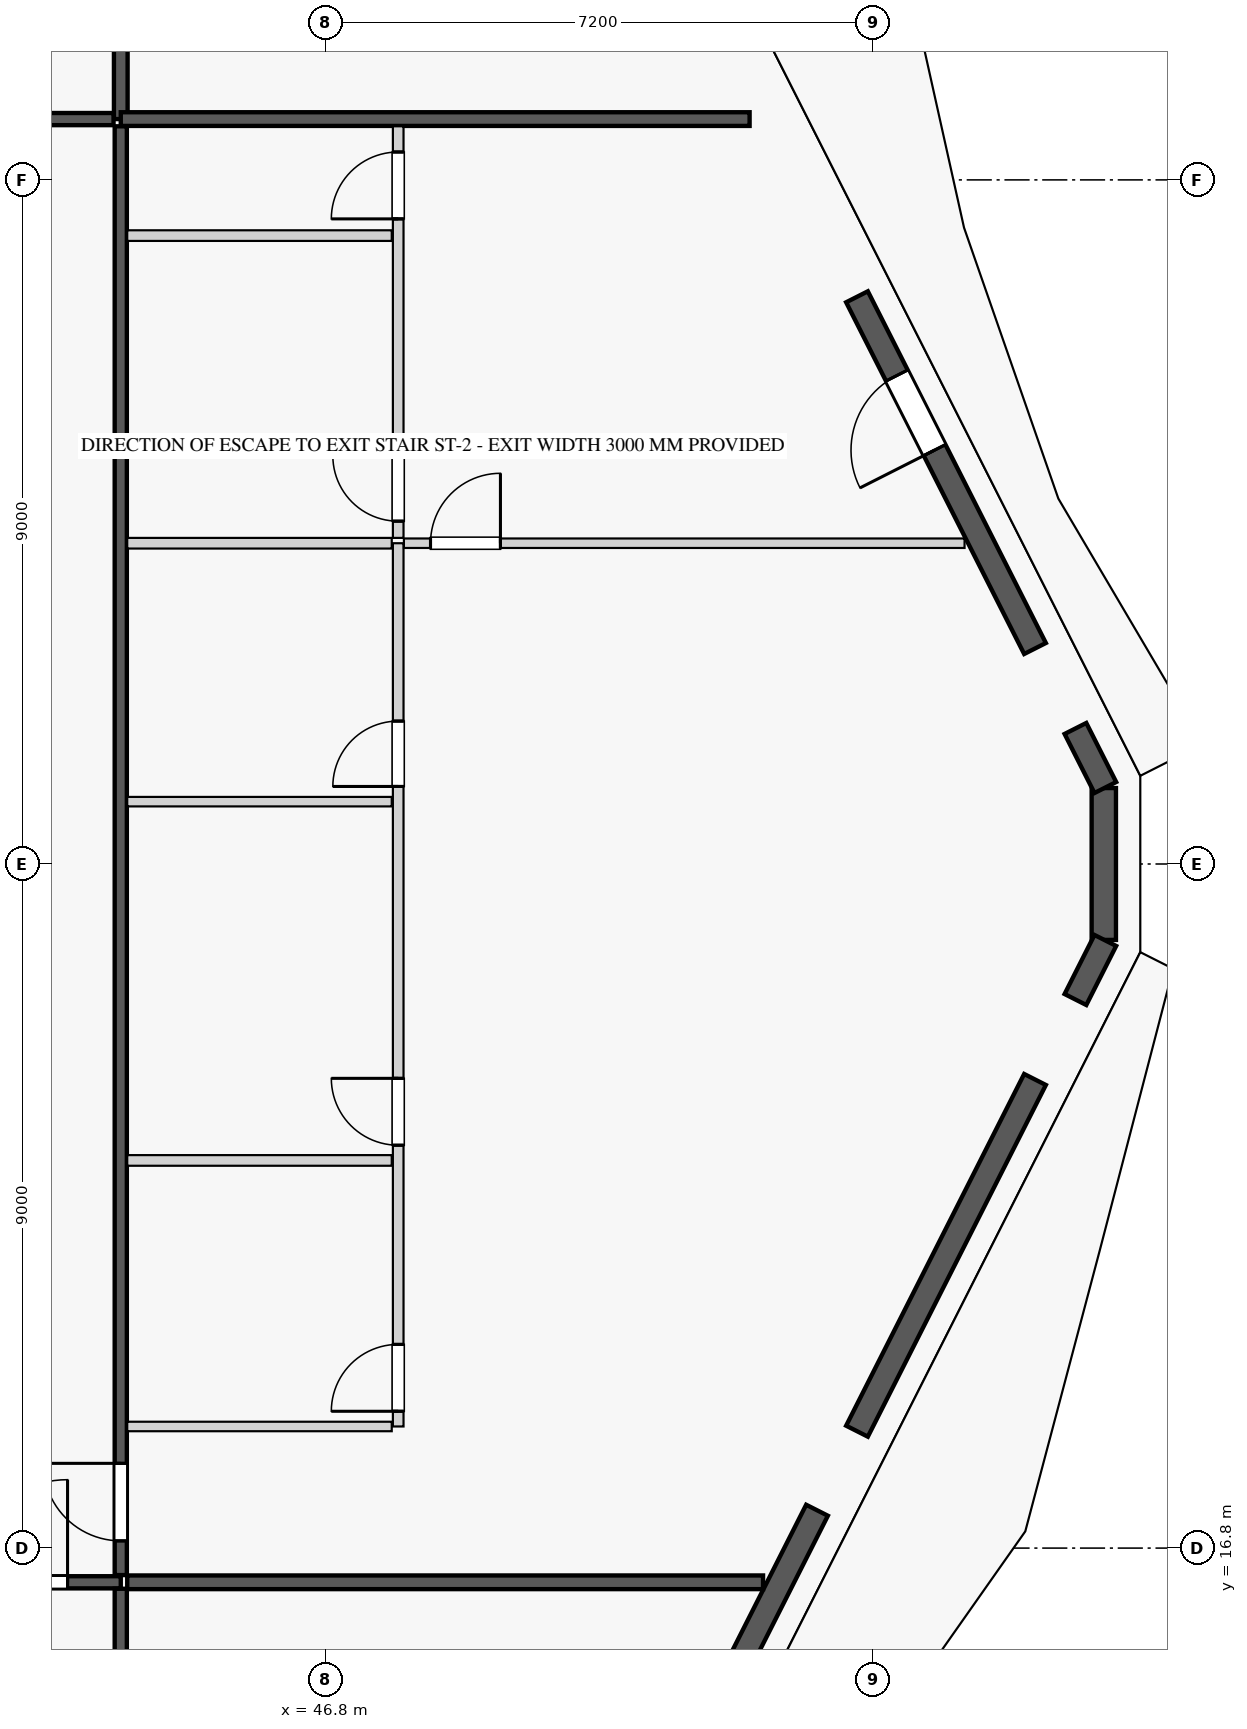
"""IFC4 building model, lengths in metres.
Left out: names, types, materials, properties, quantities, classifications, styles, units other than length and angle.
Written with IfcOpenShell. Run it as: python <this file> out.ifc"""

import sys

from ifc_helpers import new_model, si_unit, direction, frame, frame_2d, origin, origin_2d, place, context, subcontext, project, spatial, rectangle, extrude, element, fill, save


model = new_model("IFC4")
c1 = context("Model", 3, precision=1e-05, world=origin(), true_north=direction((0.0, 1.0)))
c2 = subcontext(c1, "Body", "Model", "MODEL_VIEW")
j1 = project(units=[si_unit("LENGTHUNIT", "METRE"), si_unit("PLANEANGLEUNIT", "RADIAN")], contexts=[c1])
p1 = place(None, origin())
s1 = spatial("IfcSite", under=j1, at=p1, CompositionType="ELEMENT")
p2 = place(p1, origin())
s2 = spatial("IfcBuilding", under=s1, at=p2, CompositionType="ELEMENT")
p3 = place(p2, frame((0.0, 0.0, 167.7)))
s3 = spatial("IfcBuildingStorey", under=s2, at=p3, CompositionType="ELEMENT", Elevation=167.7)
for number, where, z_axis, x_axis in (
    (1, (53.452, 17.824, 0.0), (0.0, 0.0, 1.0), (1.0, 0.0, 0.0)),
    (2, (56.357, 23.491, 0.0), (0.0, 0.0, 1.0), (1.0, 0.0, 0.0)),
    (3, (56.357, 28.109, 0.0), (0.0, 0.0, 1.0), (1.0, 0.0, 0.0)),
    (4, (53.452, 33.776, 0.0), (0.0, 0.0, 1.0), (1.0, 0.0, 0.0)),
):
    element("IfcColumn", number, at=place(p3, frame(where, z_axis=z_axis, x_axis=x_axis)), inside=s3, PredefinedType="COLUMN", context=c2, shape_type="SweptSolid", body=[
        extrude(rectangle(XDim=0.9, YDim=0.9, at=origin_2d()), origin(), (0.0, 0.0, 1.0), 4.2),
    ])
p4 = place(p3, frame((56.357, 25.8, 0.0), z_axis=(0.0, 0.0, 1.0), x_axis=(0.0, 1.0, 0.0)))
e5 = element("IfcColumn", 5, at=p4, inside=s3, PredefinedType="PILASTER", context=c2, shape_type="SweptSolid", body=[
    extrude(rectangle(XDim=0.5, YDim=0.35, at=origin_2d()), origin(), (0.0, 0.0, 1.0), 4.2),
])
p5 = place(p3, frame((57.033, 24.801, 0.0), z_axis=(0.0, 0.0, 1.0), x_axis=(0.0, 1.0, 0.0)))
e6 = element("IfcWall", 6, at=p5, inside=s3, PredefinedType="STANDARD", context=c2, shape_type="SweptSolid", body=[
    extrude(rectangle(XDim=1.998, YDim=0.32, at=frame_2d((0.999, 0.0))), origin(), (0.0, 0.0, 1.0), 4.0),
])
p6 = place(p3, frame((50.818, 12.471, 0.0), z_axis=(0.0, 0.0, 1.0), x_axis=(0.451396817628, 0.892323323149, 0.0)))
e7 = element("IfcWall", 7, at=p6, inside=s3, PredefinedType="STANDARD", context=c2, shape_type="SweptSolid", body=[
    extrude(rectangle(XDim=5.41, YDim=0.32, at=frame_2d((2.705, 0.0))), origin(), (0.0, 0.0, 1.0), 2.59),
])
p7 = place(p6, frame((1.501, 0.0, 0.0)))
e8 = element("IfcOpeningElement", 8, at=p7, cuts=e7, PredefinedType="OPENING", context=c2, shape_type="SweptSolid", body=[
    extrude(rectangle(XDim=1.1, YDim=2.25, at=frame_2d((0.55, 1.125))), frame((0.0, 0.17, 0.0), z_axis=(0.0, -1.0, 0.0), x_axis=(1.0, 0.0, 0.0)), (0.0, 0.0, 1.0), 0.34),
])
p8 = place(p3, frame((53.786, 18.338, 0.0), z_axis=(0.0, 0.0, 1.0), x_axis=(0.451595655361, 0.892222709899, 0.0)))
e9 = element("IfcWall", 9, at=p8, inside=s3, PredefinedType="STANDARD", context=c2, shape_type="SweptSolid", body=[
    extrude(rectangle(XDim=5.186, YDim=0.32, at=frame_2d((2.593, 0.0))), origin(), (0.0, 0.0, 1.0), 2.59),
])
p9 = place(p8, frame((2.043, 0.0, 0.75)))
e10 = element("IfcOpeningElement", 10, at=p9, cuts=e9, PredefinedType="OPENING", context=c2, shape_type="SweptSolid", body=[
    extrude(rectangle(XDim=1.1, YDim=1.69, at=frame_2d((0.55, 0.845))), frame((0.0, 0.17, 0.0), z_axis=(0.0, -1.0, 0.0), x_axis=(1.0, 0.0, 0.0)), (0.0, 0.0, 1.0), 0.34),
])
p10 = place(p3, frame((56.66, 24.017, 0.0), z_axis=(0.0, 0.0, 1.0), x_axis=(0.451470851004, 0.892285868258, 0.0)))
e11 = element("IfcWall", 11, at=p10, inside=s3, PredefinedType="STANDARD", context=c2, shape_type="SweptSolid", body=[
    extrude(rectangle(XDim=0.871, YDim=0.32, at=frame_2d((0.435, 0.0))), origin(), (0.0, 0.0, 1.0), 4.0),
])
p11 = place(p3, frame((57.053, 26.806, 0.0), z_axis=(0.0, 0.0, 1.0), x_axis=(-0.451357912295, 0.892343003003, 0.0)))
e12 = element("IfcWall", 12, at=p11, inside=s3, PredefinedType="STANDARD", context=c2, shape_type="SweptSolid", body=[
    extrude(rectangle(XDim=0.871, YDim=0.32, at=frame_2d((0.436, 0.0))), origin(), (0.0, 0.0, 1.0), 4.0),
])
p12 = place(p3, frame((56.128, 28.635, 0.0), z_axis=(0.0, 0.0, 1.0), x_axis=(-0.451614623916, 0.892213108772, 0.0)))
e13 = element("IfcWall", 13, at=p12, inside=s3, PredefinedType="STANDARD", context=c2, shape_type="SweptSolid", body=[
    extrude(rectangle(XDim=5.186, YDim=0.32, at=frame_2d((2.593, 0.0))), origin(), (0.0, 0.0, 1.0), 2.59),
])
p13 = place(p12, frame((2.925, 0.0, 0.0)))
e14 = element("IfcOpeningElement", 14, at=p13, cuts=e13, PredefinedType="OPENING", context=c2, shape_type="SweptSolid", body=[
    extrude(rectangle(XDim=1.1, YDim=2.25, at=frame_2d((0.55, 1.125))), frame((0.0, 0.17, 0.0), z_axis=(0.0, -1.0, 0.0), x_axis=(1.0, 0.0, 0.0)), (0.0, 0.0, 1.0), 0.34),
])
p14 = place(p12, frame((0.22, 0.0, 0.75)))
e15 = element("IfcOpeningElement", 15, at=p14, cuts=e13, PredefinedType="OPENING", context=c2, shape_type="SweptSolid", body=[
    extrude(rectangle(XDim=1.094, YDim=1.56, at=frame_2d((0.547, 0.78))), frame((0.0, 0.17, 0.0), z_axis=(0.0, -1.0, 0.0), x_axis=(1.0, 0.0, 0.0)), (0.0, 0.0, 1.0), 0.34),
])
p15 = place(p3, frame((20.7, 16.35, 0.0), z_axis=(0.0, 0.0, 1.0), x_axis=(1.0, 0.0, 0.0)))
e16 = element("IfcWall", 16, at=p15, inside=s3, PredefinedType="PARTITIONING", context=c2, shape_type="SweptSolid", body=[
    extrude(rectangle(XDim=23.4, YDim=0.16, at=frame_2d((11.7, 0.0))), origin(), (0.0, 0.0, 1.0), 4.0),
])
p16 = place(p15, frame((8.518, 0.0, 0.0)))
e17 = element("IfcOpeningElement", 17, at=p16, cuts=e16, PredefinedType="OPENING", context=c2, shape_type="SweptSolid", body=[
    extrude(rectangle(XDim=1.35, YDim=2.35, at=frame_2d((0.675, 1.175))), frame((0.0, 0.09, 0.0), z_axis=(0.0, -1.0, 0.0), x_axis=(1.0, 0.0, 0.0)), (0.0, 0.0, 1.0), 0.18),
])
p17 = place(p15, frame((21.35, 0.0, 0.0)))
e18 = element("IfcOpeningElement", 18, at=p17, cuts=e16, PredefinedType="OPENING", context=c2, shape_type="SweptSolid", body=[
    extrude(rectangle(XDim=1.35, YDim=2.35, at=frame_2d((0.675, 1.175))), frame((0.0, 0.09, 0.0), z_axis=(0.0, -1.0, 0.0), x_axis=(1.0, 0.0, 0.0)), (0.0, 0.0, 1.0), 0.18),
])
p18 = place(p3, frame((44.1, 4.015, 0.0), z_axis=(0.0, 0.0, 1.0), x_axis=(0.0, 1.0, 0.0)))
e19 = element("IfcWall", 19, at=p18, inside=s3, PredefinedType="PARTITIONING", context=c2, shape_type="SweptSolid", body=[
    extrude(rectangle(XDim=12.25, YDim=0.16, at=frame_2d((6.125, 0.0))), origin(), (0.0, 0.0, 1.0), 4.0),
])
p19 = place(p3, frame((44.1, 35.6, 0.0), z_axis=(0.0, 0.0, 1.0), x_axis=(0.0, 1.0, 0.0)))
e20 = element("IfcWall", 20, at=p19, inside=s3, PredefinedType="PARTITIONING", context=c2, shape_type="SweptSolid", body=[
    extrude(rectangle(XDim=11.985, YDim=0.18, at=frame_2d((5.992, 0.0))), origin(), (0.0, 0.0, 1.0), 4.0),
])
p20 = place(p3, frame((28.663, 35.6, 0.0), z_axis=(0.0, 0.0, 1.0), x_axis=(1.0, 0.0, 0.0)))
e21 = element("IfcWall", 21, at=p20, inside=s3, PredefinedType="PARTITIONING", context=c2, shape_type="SweptSolid", body=[
    extrude(rectangle(XDim=15.342, YDim=0.16, at=frame_2d((7.671, 0.0))), origin(), (0.0, 0.0, 1.0), 4.0),
])
p21 = place(p20, frame((13.387, 0.0, 0.0)))
e22 = element("IfcOpeningElement", 22, at=p21, cuts=e21, PredefinedType="OPENING", context=c2, shape_type="SweptSolid", body=[
    extrude(rectangle(XDim=1.02, YDim=2.25, at=frame_2d((0.51, 1.125))), frame((0.0, 0.09, 0.0), z_axis=(0.0, -1.0, 0.0), x_axis=(1.0, 0.0, 0.0)), (0.0, 0.0, 1.0), 0.18),
])
p22 = place(p3, frame((44.185, 16.35, 0.0), z_axis=(0.0, 0.0, 1.0), x_axis=(1.0, 0.0, 0.0)))
e23 = element("IfcWall", 23, at=p22, inside=s3, PredefinedType="PARTITIONING", context=c2, shape_type="SweptSolid", body=[
    extrude(rectangle(XDim=8.365, YDim=0.18, at=frame_2d((4.183, 0.0))), origin(), (0.0, 0.0, 1.0), 4.0),
])
p23 = place(p3, frame((44.1, 35.6, 0.0), z_axis=(0.0, 0.0, 1.0), x_axis=(1.0, 0.0, 0.0)))
e24 = element("IfcWall", 24, at=p23, inside=s3, PredefinedType="PARTITIONING", context=c2, shape_type="SweptSolid", body=[
    extrude(rectangle(XDim=8.273, YDim=0.18, at=frame_2d((4.136, 0.0))), origin(), (0.0, 0.0, 1.0), 4.0),
])
p24 = place(p3, frame((44.1, 16.445, 0.0), z_axis=(0.0, 0.0, 1.0), x_axis=(0.0, 1.0, 0.0)))
e25 = element("IfcWall", 25, at=p24, inside=s3, PredefinedType="PARTITIONING", context=c2, shape_type="SweptSolid", body=[
    extrude(rectangle(XDim=19.06, YDim=0.16, at=frame_2d((9.53, 0.0))), origin(), (0.0, 0.0, 1.0), 4.0),
])
p25 = place(p24, frame((0.45, 0.0, 0.0)))
e26 = element("IfcOpeningElement", 26, at=p25, cuts=e25, PredefinedType="OPENING", context=c2, shape_type="SweptSolid", body=[
    extrude(rectangle(XDim=1.02, YDim=2.25, at=frame_2d((0.51, 1.125))), frame((0.0, 0.09, 0.0), z_axis=(0.0, -1.0, 0.0), x_axis=(1.0, 0.0, 0.0)), (0.0, 0.0, 1.0), 0.18),
])
p26 = place(p3, frame((44.185, 18.4, 0.0), z_axis=(0.0, 0.0, 1.0), x_axis=(1.0, 0.0, 0.0)))
e27 = element("IfcWall", 27, at=p26, inside=s3, PredefinedType="PARTITIONING", context=c2, shape_type="SweptSolid", body=[
    extrude(rectangle(XDim=3.48, YDim=0.125, at=frame_2d((1.74, 0.0))), origin(), (0.0, 0.0, 1.0), 2.59),
])
p27 = place(p3, frame((47.75, 18.4, 0.0), z_axis=(0.0, 0.0, 1.0), x_axis=(0.0, 1.0, 0.0)))
e28 = element("IfcWall", 28, at=p27, inside=s3, PredefinedType="PLUMBINGWALL", context=c2, shape_type="SweptSolid", body=[
    extrude(rectangle(XDim=11.62, YDim=0.14, at=frame_2d((5.81, 0.0))), origin(), (0.0, 0.0, 1.0), 4.0),
])
p28 = place(p27, frame((0.2, 0.0, 0.0)))
e29 = element("IfcOpeningElement", 29, at=p28, cuts=e28, PredefinedType="OPENING", context=c2, shape_type="SweptSolid", body=[
    extrude(rectangle(XDim=0.88, YDim=2.15, at=frame_2d((0.44, 1.075))), frame((0.0, 0.08, 0.0), z_axis=(0.0, -1.0, 0.0), x_axis=(1.0, 0.0, 0.0)), (0.0, 0.0, 1.0), 0.16),
])
p29 = place(p27, frame((3.7, 0.0, 0.0)))
e30 = element("IfcOpeningElement", 30, at=p29, cuts=e28, PredefinedType="OPENING", context=c2, shape_type="SweptSolid", body=[
    extrude(rectangle(XDim=0.88, YDim=2.15, at=frame_2d((0.44, 1.075))), frame((0.0, 0.08, 0.0), z_axis=(0.0, -1.0, 0.0), x_axis=(1.0, 0.0, 0.0)), (0.0, 0.0, 1.0), 0.16),
])
p30 = place(p27, frame((8.42, 0.0, 0.0)))
e31 = element("IfcOpeningElement", 31, at=p30, cuts=e28, PredefinedType="OPENING", context=c2, shape_type="SweptSolid", body=[
    extrude(rectangle(XDim=0.86, YDim=2.1, at=frame_2d((0.43, 1.05))), frame((0.0, 0.08, 0.0), z_axis=(0.0, -1.0, 0.0), x_axis=(1.0, 0.0, 0.0)), (0.0, 0.0, 1.0), 0.16),
])
p31 = place(p3, frame((47.75, 30.09, 0.0), z_axis=(0.0, 0.0, 1.0), x_axis=(0.0, 1.0, 0.0)))
e32 = element("IfcWall", 32, at=p31, inside=s3, PredefinedType="PLUMBINGWALL", context=c2, shape_type="SweptSolid", body=[
    extrude(rectangle(XDim=5.415, YDim=0.14, at=frame_2d((2.708, 0.0))), origin(), (0.0, 0.0, 1.0), 4.0),
])
p32 = place(p31, frame((0.22, 0.0, 0.0)))
e33 = element("IfcOpeningElement", 33, at=p32, cuts=e32, PredefinedType="OPENING", context=c2, shape_type="SweptSolid", body=[
    extrude(rectangle(XDim=0.86, YDim=2.1, at=frame_2d((0.43, 1.05))), frame((0.0, 0.08, 0.0), z_axis=(0.0, -1.0, 0.0), x_axis=(1.0, 0.0, 0.0)), (0.0, 0.0, 1.0), 0.16),
])
p33 = place(p31, frame((4.197, 0.0, 0.0)))
e34 = element("IfcOpeningElement", 34, at=p33, cuts=e32, PredefinedType="OPENING", context=c2, shape_type="SweptSolid", body=[
    extrude(rectangle(XDim=0.88, YDim=2.15, at=frame_2d((0.44, 1.075))), frame((0.0, 0.08, 0.0), z_axis=(0.0, -1.0, 0.0), x_axis=(1.0, 0.0, 0.0)), (0.0, 0.0, 1.0), 0.16),
])
p34 = place(p3, frame((44.185, 30.02, 0.0), z_axis=(0.0, 0.0, 1.0), x_axis=(1.0, 0.0, 0.0)))
e35 = element("IfcWall", 35, at=p34, inside=s3, PredefinedType="PLUMBINGWALL", context=c2, shape_type="SweptSolid", body=[
    extrude(rectangle(XDim=3.48, YDim=0.14, at=frame_2d((1.74, 0.0))), origin(), (0.0, 0.0, 1.0), 4.0),
])
p35 = place(p3, frame((47.825, 30.02, 0.0), z_axis=(0.0, 0.0, 1.0), x_axis=(1.0, 0.0, 0.0)))
e36 = element("IfcWall", 36, at=p35, inside=s3, PredefinedType="PARTITIONING", context=c2, shape_type="SweptSolid", body=[
    extrude(rectangle(XDim=7.376, YDim=0.125, at=frame_2d((3.688, 0.0))), origin(), (0.0, 0.0, 1.0), 4.0),
])
p36 = place(p35, frame((0.35, 0.0, 0.0)))
e37 = element("IfcOpeningElement", 37, at=p36, cuts=e36, PredefinedType="OPENING", context=c2, shape_type="SweptSolid", body=[
    extrude(rectangle(XDim=0.92, YDim=2.15, at=frame_2d((0.46, 1.075))), frame((0.0, 0.073, 0.0), z_axis=(0.0, -1.0, 0.0), x_axis=(1.0, 0.0, 0.0)), (0.0, 0.0, 1.0), 0.145),
])
p37 = place(p3, frame((44.185, 21.9, 0.0), z_axis=(0.0, 0.0, 1.0), x_axis=(1.0, 0.0, 0.0)))
e38 = element("IfcWall", 38, at=p37, inside=s3, PredefinedType="PLUMBINGWALL", context=c2, shape_type="SweptSolid", body=[
    extrude(rectangle(XDim=3.48, YDim=0.14, at=frame_2d((1.74, 0.0))), origin(), (0.0, 0.0, 1.0), 4.0),
])
p38 = place(p3, frame((44.185, 26.62, 0.0), z_axis=(0.0, 0.0, 1.0), x_axis=(1.0, 0.0, 0.0)))
e39 = element("IfcWall", 39, at=p38, inside=s3, PredefinedType="PARTITIONING", context=c2, shape_type="SweptSolid", body=[
    extrude(rectangle(XDim=3.48, YDim=0.125, at=frame_2d((1.74, 0.0))), origin(), (0.0, 0.0, 1.0), 4.0),
])
p39 = place(p3, frame((44.185, 34.067, 0.0), z_axis=(0.0, 0.0, 1.0), x_axis=(1.0, 0.0, 0.0)))
e40 = element("IfcWall", 40, at=p39, inside=s3, PredefinedType="PLUMBINGWALL", context=c2, shape_type="SweptSolid", body=[
    extrude(rectangle(XDim=3.48, YDim=0.14, at=frame_2d((1.74, 0.0))), origin(), (0.0, 0.0, 1.0), 4.0),
])
p40 = place(p9, origin())
e41 = element("IfcWindow", 41, at=p40, inside=s3, PartitioningType="SINGLE_PANEL", PredefinedType="WINDOW", context=c2, shape_type="SweptSolid", body=[
    extrude(rectangle(XDim=1.1, YDim=1.69, at=frame_2d((0.55, 0.845))), frame((0.0, 0.03, 0.0), z_axis=(0.0, -1.0, 0.0), x_axis=(1.0, 0.0, 0.0)), (0.0, 0.0, 1.0), 0.06),
])
fill(e10, e41)
p41 = place(p13, origin())
e42 = element("IfcDoor", 42, at=p41, inside=s3, OperationType="SINGLE_SWING_LEFT", PredefinedType="DOOR", context=c2, shape_type="SweptSolid", body=[
    extrude(rectangle(XDim=1.1, YDim=2.25, at=frame_2d((0.55, 1.125))), frame((0.0, 0.025, 0.0), z_axis=(0.0, -1.0, 0.0), x_axis=(1.0, 0.0, 0.0)), (0.0, 0.0, 1.0), 0.05),
])
fill(e14, e42)
p42 = place(p17, origin())
e43 = element("IfcDoor", 43, at=p42, inside=s3, OperationType="SINGLE_SWING_RIGHT", PredefinedType="DOOR", context=c2, shape_type="SweptSolid", body=[
    extrude(rectangle(XDim=1.35, YDim=2.35, at=frame_2d((0.675, 1.175))), frame((0.0, 0.025, 0.0), z_axis=(0.0, -1.0, 0.0), x_axis=(1.0, 0.0, 0.0)), (0.0, 0.0, 1.0), 0.05),
])
fill(e18, e43)
p43 = place(p28, origin())
e44 = element("IfcDoor", 44, at=p43, inside=s3, OperationType="SINGLE_SWING_LEFT", PredefinedType="DOOR", context=c2, shape_type="SweptSolid", body=[
    extrude(rectangle(XDim=0.88, YDim=2.15, at=frame_2d((0.44, 1.075))), frame((0.0, 0.025, 0.0), z_axis=(0.0, -1.0, 0.0), x_axis=(1.0, 0.0, 0.0)), (0.0, 0.0, 1.0), 0.05),
])
fill(e29, e44)
p44 = place(p29, origin())
e45 = element("IfcDoor", 45, at=p44, inside=s3, OperationType="SINGLE_SWING_RIGHT", PredefinedType="DOOR", context=c2, shape_type="SweptSolid", body=[
    extrude(rectangle(XDim=0.88, YDim=2.15, at=frame_2d((0.44, 1.075))), frame((0.0, 0.025, 0.0), z_axis=(0.0, -1.0, 0.0), x_axis=(1.0, 0.0, 0.0)), (0.0, 0.0, 1.0), 0.05),
])
fill(e30, e45)
p45 = place(p30, origin())
e46 = element("IfcDoor", 46, at=p45, inside=s3, OperationType="SINGLE_SWING_LEFT", PredefinedType="DOOR", context=c2, shape_type="SweptSolid", body=[
    extrude(rectangle(XDim=0.86, YDim=2.1, at=frame_2d((0.43, 1.05))), frame((0.0, 0.025, 0.0), z_axis=(0.0, -1.0, 0.0), x_axis=(1.0, 0.0, 0.0)), (0.0, 0.0, 1.0), 0.05),
])
fill(e31, e46)
p46 = place(p32, origin())
e47 = element("IfcDoor", 47, at=p46, inside=s3, OperationType="SINGLE_SWING_RIGHT", PredefinedType="DOOR", context=c2, shape_type="SweptSolid", body=[
    extrude(rectangle(XDim=0.86, YDim=2.1, at=frame_2d((0.43, 1.05))), frame((0.0, 0.025, 0.0), z_axis=(0.0, -1.0, 0.0), x_axis=(1.0, 0.0, 0.0)), (0.0, 0.0, 1.0), 0.05),
])
fill(e33, e47)
p47 = place(p33, origin())
e48 = element("IfcDoor", 48, at=p47, inside=s3, OperationType="SINGLE_SWING_LEFT", PredefinedType="DOOR", context=c2, shape_type="SweptSolid", body=[
    extrude(rectangle(XDim=0.88, YDim=2.15, at=frame_2d((0.44, 1.075))), frame((0.0, 0.025, 0.0), z_axis=(0.0, -1.0, 0.0), x_axis=(1.0, 0.0, 0.0)), (0.0, 0.0, 1.0), 0.05),
])
fill(e34, e48)
p48 = place(p25, origin())
e49 = element("IfcDoor", 49, at=p48, inside=s3, OperationType="SINGLE_SWING_RIGHT", PredefinedType="DOOR", context=c2, shape_type="SweptSolid", body=[
    extrude(rectangle(XDim=1.02, YDim=2.25, at=frame_2d((0.51, 1.125))), frame((0.0, 0.025, 0.0), z_axis=(0.0, -1.0, 0.0), x_axis=(1.0, 0.0, 0.0)), (0.0, 0.0, 1.0), 0.05),
])
fill(e26, e49)
p49 = place(p36, origin())
e50 = element("IfcDoor", 50, at=p49, inside=s3, OperationType="SINGLE_SWING_RIGHT", PredefinedType="DOOR", context=c2, shape_type="SweptSolid", body=[
    extrude(rectangle(XDim=0.92, YDim=2.15, at=frame_2d((0.46, 1.075))), frame((0.0, 0.025, 0.0), z_axis=(0.0, -1.0, 0.0), x_axis=(1.0, 0.0, 0.0)), (0.0, 0.0, 1.0), 0.05),
])
fill(e37, e50)
p50 = place(p14, origin())
e51 = element("IfcWindow", 51, at=p50, inside=s3, PartitioningType="SINGLE_PANEL", PredefinedType="WINDOW", context=c2, shape_type="SweptSolid", body=[
    extrude(rectangle(XDim=1.094, YDim=1.56, at=frame_2d((0.547, 0.78))), frame((0.0, 0.03, 0.0), z_axis=(0.0, -1.0, 0.0), x_axis=(1.0, 0.0, 0.0)), (0.0, 0.0, 1.0), 0.06),
])
fill(e15, e51)
save(model, sys.argv[1])
